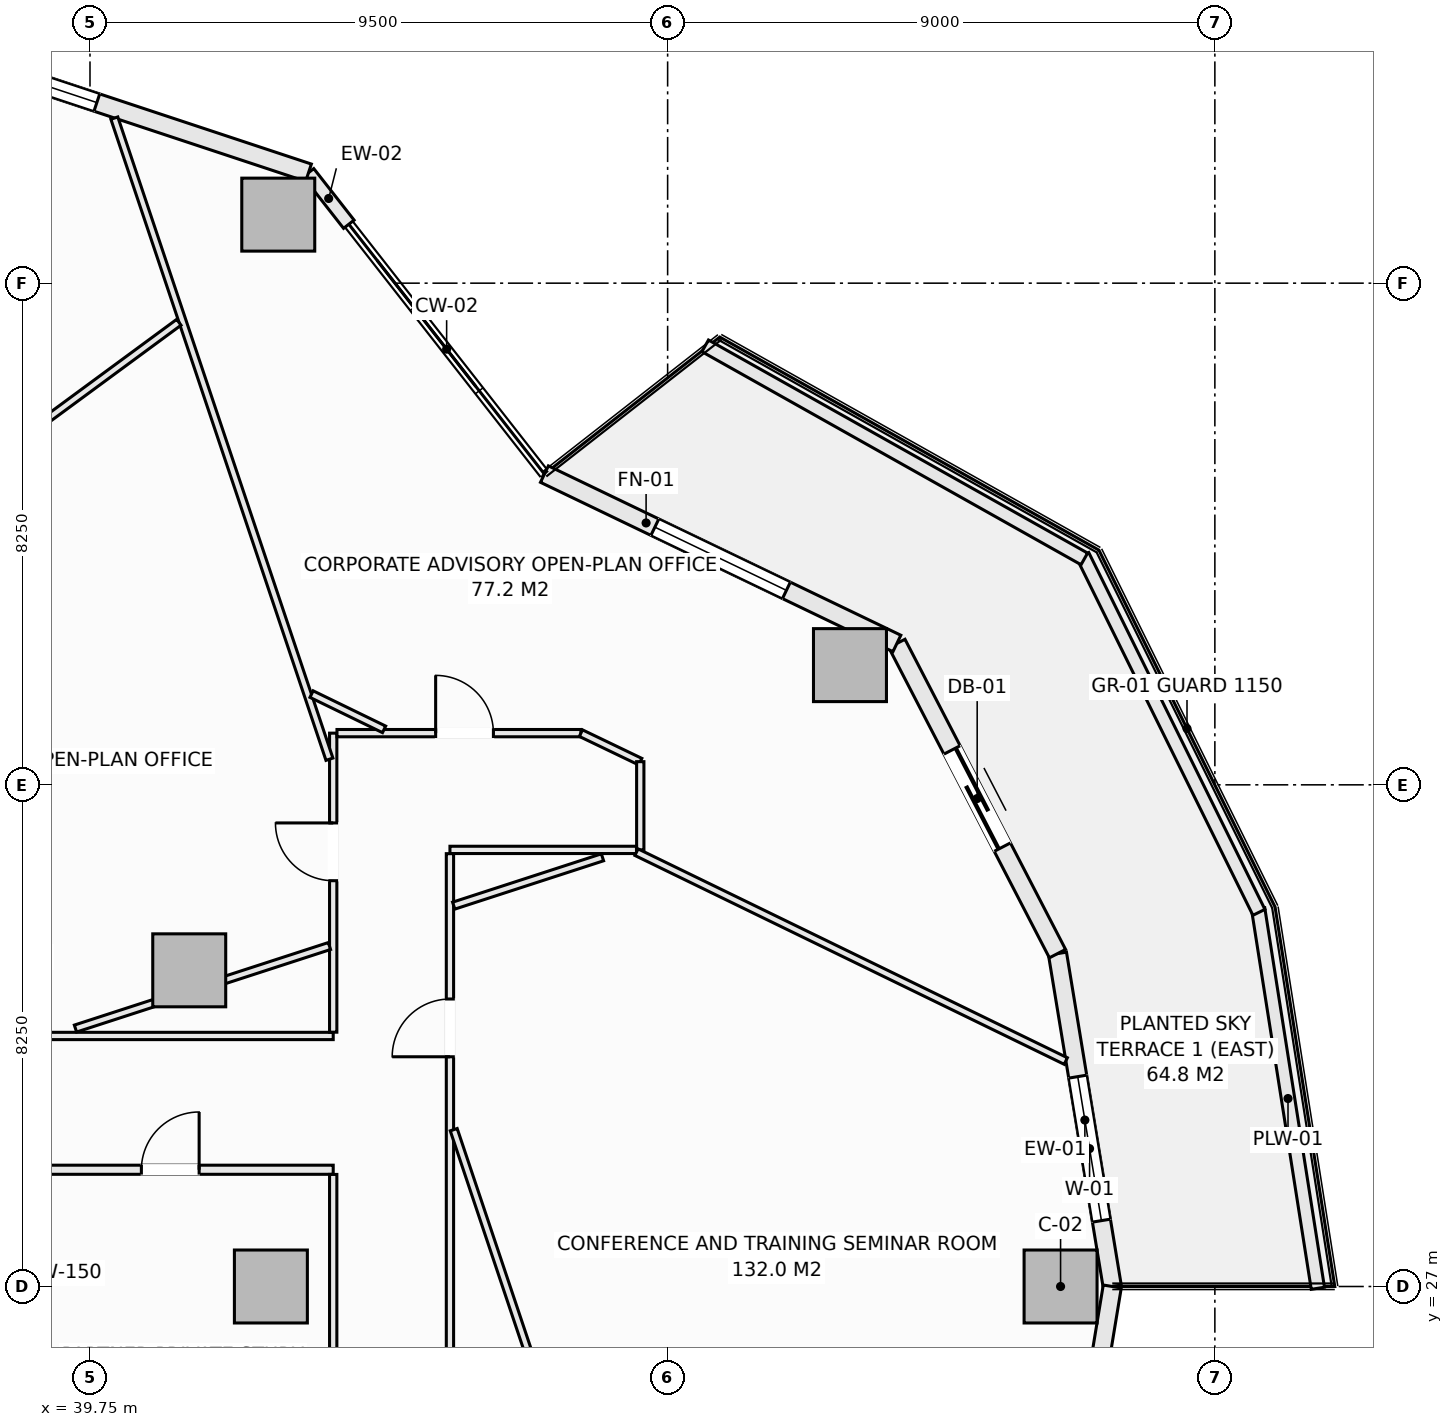
"""IFC4 building model, lengths in metres.
Left out: names, types, materials, properties, quantities, classifications, styles, units other than length and angle.
Written with IfcOpenShell. Run it as: python <this file> out.ifc"""

import sys

from ifc_helpers import new_model, si_unit, direction, frame, frame_2d, origin, origin_2d, place, context, subcontext, project, spatial, rectangle, extrude, element, fill, save


model = new_model("IFC4")
c1 = context("Model", 3, precision=1e-05, world=origin(), true_north=direction((0.0, 1.0)))
c2 = subcontext(c1, "Body", "Model", "MODEL_VIEW")
j1 = project(units=[si_unit("LENGTHUNIT", "METRE"), si_unit("PLANEANGLEUNIT", "RADIAN")], contexts=[c1])
p1 = place(None, origin())
s1 = spatial("IfcSite", under=j1, at=p1, CompositionType="ELEMENT")
p2 = place(p1, origin())
s2 = spatial("IfcBuilding", under=s1, at=p2, CompositionType="ELEMENT")
p3 = place(p2, frame((0.0, 0.0, 91.95)))
s3 = spatial("IfcBuildingStorey", under=s2, at=p3, CompositionType="ELEMENT", Elevation=91.95)
for number, where, z_axis, x_axis in (
    (1, (55.712, 27.0, -0.28), (0.0, 0.0, 1.0), (1.0, 0.0, 0.0)),
    (2, (52.249, 37.219, -0.28), (0.0, 0.0, 1.0), (1.0, 0.0, 0.0)),
    (3, (42.846, 44.627, -0.28), (0.0, 0.0, 1.0), (1.0, 0.0, 0.0)),
    (4, (42.725, 27.0, -0.28), (0.0, 0.0, 1.0), (1.0, 0.0, 0.0)),
    (5, (41.382, 32.199, -0.28), (0.0, 0.0, 1.0), (1.0, 0.0, 0.0)),
):
    element("IfcColumn", number, at=place(p3, frame(where, z_axis=z_axis, x_axis=x_axis)), inside=s3, PredefinedType="COLUMN", context=c2, shape_type="SweptSolid", body=[
        extrude(rectangle(XDim=1.2, YDim=1.2, at=origin_2d()), origin(), (0.0, 0.0, 1.0), 3.81),
    ])
p4 = place(p3, frame((55.662, 32.474, 0.0), z_axis=(0.0, 0.0, 1.0), x_axis=(0.162386212206, -0.986727276447, 0.0)))
e6 = element("IfcWall", 6, at=p4, inside=s3, PredefinedType="SOLIDWALL", context=c2, shape_type="SweptSolid", body=[
    extrude(rectangle(XDim=5.548, YDim=0.3, at=frame_2d((2.774, 0.0))), origin(), (0.0, 0.0, 1.0), 3.053),
])
p5 = place(p4, frame((2.05, 0.0, 0.85)))
e7 = element("IfcOpeningElement", 7, at=p5, cuts=e6, PredefinedType="OPENING", context=c2, shape_type="SweptSolid", body=[
    extrude(rectangle(XDim=2.4, YDim=1.9, at=frame_2d((1.2, 0.95))), frame((0.0, 0.16, 0.0), z_axis=(0.0, -1.0, 0.0), x_axis=(1.0, 0.0, 0.0)), (0.0, 0.0, 1.0), 0.32),
])
p6 = place(p3, frame((53.021, 37.575, 0.0), z_axis=(0.0, 0.0, 1.0), x_axis=(0.459800981414, -0.888021991558, 0.0)))
e8 = element("IfcWall", 8, at=p6, inside=s3, PredefinedType="SOLIDWALL", context=c2, shape_type="SweptSolid", body=[
    extrude(rectangle(XDim=5.744, YDim=0.3, at=frame_2d((2.872, 0.0))), origin(), (0.0, 0.0, 1.0), 3.053),
])
p7 = place(p6, frame((1.972, 0.0, 0.0)))
e9 = element("IfcOpeningElement", 9, at=p7, cuts=e8, PredefinedType="OPENING", context=c2, shape_type="SweptSolid", body=[
    extrude(rectangle(XDim=1.8, YDim=2.25, at=frame_2d((0.9, 1.125))), frame((0.0, 0.16, 0.0), z_axis=(0.0, -1.0, 0.0), x_axis=(1.0, 0.0, 0.0)), (0.0, 0.0, 1.0), 0.32),
])
p8 = place(p3, frame((47.224, 40.36, 0.0), z_axis=(0.0, 0.0, 1.0), x_axis=(0.901354747727, -0.433081538224, 0.0)))
e10 = element("IfcWall", 10, at=p8, inside=s3, PredefinedType="SOLIDWALL", context=c2, shape_type="SweptSolid", body=[
    extrude(rectangle(XDim=6.431, YDim=0.3, at=frame_2d((3.215, 0.0))), origin(), (0.0, 0.0, 1.0), 3.053),
])
p9 = place(p8, frame((2.015, 0.0, 0.85)))
e11 = element("IfcOpeningElement", 11, at=p9, cuts=e10, PredefinedType="OPENING", context=c2, shape_type="SweptSolid", body=[
    extrude(rectangle(XDim=2.4, YDim=1.9, at=frame_2d((1.2, 0.95))), frame((0.0, 0.16, 0.0), z_axis=(0.0, -1.0, 0.0), x_axis=(1.0, 0.0, 0.0)), (0.0, 0.0, 1.0), 0.32),
])
p10 = place(p3, frame((43.344, 45.316, 0.0), z_axis=(0.0, 0.0, 1.0), x_axis=(0.616387780378, -0.787442762492, 0.0)))
e12 = element("IfcWall", 12, at=p10, inside=s3, PredefinedType="SOLIDWALL", context=c2, shape_type="SweptSolid", body=[
    extrude(rectangle(XDim=1.076, YDim=0.22, at=frame_2d((0.538, 0.0))), origin(), (0.0, 0.0, 1.0), 3.053),
])
p11 = place(p3, frame((36.968, 47.429, 0.0), z_axis=(0.0, 0.0, 1.0), x_axis=(0.949245153629, -0.314537181127, 0.0)))
e13 = element("IfcWall", 13, at=p11, inside=s3, PredefinedType="SOLIDWALL", context=c2, shape_type="SweptSolid", body=[
    extrude(rectangle(XDim=6.717, YDim=0.3, at=frame_2d((3.358, 0.0))), origin(), (0.0, 0.0, 1.0), 3.053),
])
p12 = place(p11, frame((0.65, 0.0, 0.85)))
e14 = element("IfcOpeningElement", 14, at=p12, cuts=e13, PredefinedType="OPENING", context=c2, shape_type="SweptSolid", body=[
    extrude(rectangle(XDim=2.4, YDim=1.9, at=frame_2d((1.2, 0.95))), frame((0.0, 0.16, 0.0), z_axis=(0.0, -1.0, 0.0), x_axis=(1.0, 0.0, 0.0)), (0.0, 0.0, 1.0), 0.32),
])
p13 = place(p3, frame((55.662, 21.526, 0.0), z_axis=(0.0, 0.0, 1.0), x_axis=(0.162386212206, 0.986727276447, 0.0)))
e15 = element("IfcWall", 15, at=p13, inside=s3, PredefinedType="SOLIDWALL", context=c2, shape_type="SweptSolid", body=[
    extrude(rectangle(XDim=5.548, YDim=0.3, at=frame_2d((2.774, 0.0))), origin(), (0.0, 0.0, 1.0), 3.053),
])
p14 = place(p13, frame((1.574, 0.0, 0.85)))
e16 = element("IfcOpeningElement", 16, at=p14, cuts=e15, PredefinedType="OPENING", context=c2, shape_type="SweptSolid", body=[
    extrude(rectangle(XDim=2.4, YDim=1.9, at=frame_2d((1.2, 0.95))), frame((0.0, 0.16, 0.0), z_axis=(0.0, -1.0, 0.0), x_axis=(1.0, 0.0, 0.0)), (0.0, 0.0, 1.0), 0.32),
])
p15 = place(p3, frame((58.962, 33.212, 0.0), z_axis=(0.0, 0.0, 1.0), x_axis=(0.15545655238, -0.987842730561, 0.0)))
e17 = element("IfcWall", 17, at=p15, inside=s3, PredefinedType="PARAPET", context=c2, shape_type="SweptSolid", body=[
    extrude(rectangle(XDim=6.318, YDim=0.22, at=frame_2d((3.159, 0.0))), origin(), (0.0, 0.0, 1.0), 0.52),
])
p16 = place(p3, frame((56.077, 39.021, 0.0), z_axis=(0.0, 0.0, 1.0), x_axis=(0.442686636348, -0.89667638644, 0.0)))
e18 = element("IfcWall", 18, at=p16, inside=s3, PredefinedType="PARAPET", context=c2, shape_type="SweptSolid", body=[
    extrude(rectangle(XDim=6.545, YDim=0.22, at=frame_2d((3.272, 0.0))), origin(), (0.0, 0.0, 1.0), 0.52),
])
p17 = place(p3, frame((49.868, 42.469, 0.0), z_axis=(0.0, 0.0, 1.0), x_axis=(0.871775109335, -0.489906275468, 0.0)))
e19 = element("IfcWall", 19, at=p17, inside=s3, PredefinedType="PARAPET", context=c2, shape_type="SweptSolid", body=[
    extrude(rectangle(XDim=7.152, YDim=0.22, at=frame_2d((3.576, 0.0))), origin(), (0.0, 0.0, 1.0), 0.52),
])
p18 = place(p3, frame((30.077, 28.92, 0.0), z_axis=(0.0, 0.0, 1.0), x_axis=(1.0, 0.0, 0.0)))
e20 = element("IfcWall", 20, at=p18, inside=s3, PredefinedType="PARTITIONING", context=c2, shape_type="SweptSolid", body=[
    extrude(rectangle(XDim=13.673, YDim=0.15, at=frame_2d((6.836, 0.0))), origin(), (0.0, 0.0, 1.0), 3.53),
])
p19 = place(p18, frame((1.342, 0.0, 0.0)))
e21 = element("IfcOpeningElement", 21, at=p19, cuts=e20, PredefinedType="OPENING", context=c2, shape_type="SweptSolid", body=[
    extrude(rectangle(XDim=0.95, YDim=2.1, at=frame_2d((0.475, 1.05))), frame((0.0, 0.085, 0.0), z_axis=(0.0, -1.0, 0.0), x_axis=(1.0, 0.0, 0.0)), (0.0, 0.0, 1.0), 0.17),
])
p20 = place(p18, frame((5.498, 0.0, 0.0)))
e22 = element("IfcOpeningElement", 22, at=p20, cuts=e20, PredefinedType="OPENING", context=c2, shape_type="SweptSolid", body=[
    extrude(rectangle(XDim=0.95, YDim=2.1, at=frame_2d((0.475, 1.05))), frame((0.0, 0.085, 0.0), z_axis=(0.0, -1.0, 0.0), x_axis=(1.0, 0.0, 0.0)), (0.0, 0.0, 1.0), 0.17),
])
p21 = place(p18, frame((10.518, 0.0, 0.0)))
e23 = element("IfcOpeningElement", 23, at=p21, cuts=e20, PredefinedType="OPENING", context=c2, shape_type="SweptSolid", body=[
    extrude(rectangle(XDim=0.95, YDim=2.1, at=frame_2d((0.475, 1.05))), frame((0.0, 0.085, 0.0), z_axis=(0.0, -1.0, 0.0), x_axis=(1.0, 0.0, 0.0)), (0.0, 0.0, 1.0), 0.17),
])
p22 = place(p3, frame((39.02, 31.12, 0.0), z_axis=(0.0, 0.0, 1.0), x_axis=(1.0, 0.0, 0.0)))
e24 = element("IfcWall", 24, at=p22, inside=s3, PredefinedType="PARTITIONING", context=c2, shape_type="SweptSolid", body=[
    extrude(rectangle(XDim=4.73, YDim=0.12, at=frame_2d((2.365, 0.0))), origin(), (0.0, 0.0, 1.0), 3.53),
])
p23 = place(p3, frame((43.75, 25.197, 0.0), z_axis=(0.0, 0.0, 1.0), x_axis=(0.0, 1.0, 0.0)))
e25 = element("IfcWall", 25, at=p23, inside=s3, PredefinedType="PARTITIONING", context=c2, shape_type="SweptSolid", body=[
    extrude(rectangle(XDim=3.646, YDim=0.12, at=frame_2d((1.823, 0.0))), origin(), (0.0, 0.0, 1.0), 3.53),
])
p24 = place(p3, frame((43.75, 31.182, 0.0), z_axis=(0.0, 0.0, 1.0), x_axis=(0.0, 1.0, 0.0)))
e26 = element("IfcWall", 26, at=p24, inside=s3, PredefinedType="PARTITIONING", context=c2, shape_type="SweptSolid", body=[
    extrude(rectangle(XDim=4.918, YDim=0.12, at=frame_2d((2.459, 0.0))), origin(), (0.0, 0.0, 1.0), 3.53),
])
p25 = place(p24, frame((2.491, 0.0, 0.0)))
e27 = element("IfcOpeningElement", 27, at=p25, cuts=e26, PredefinedType="OPENING", context=c2, shape_type="SweptSolid", body=[
    extrude(rectangle(XDim=0.95, YDim=2.1, at=frame_2d((0.475, 1.05))), frame((0.0, 0.07, 0.0), z_axis=(0.0, -1.0, 0.0), x_axis=(1.0, 0.0, 0.0)), (0.0, 0.0, 1.0), 0.14),
])
p26 = place(p3, frame((43.812, 36.1, 0.0), z_axis=(0.0, 0.0, 1.0), x_axis=(1.0, 0.0, 0.0)))
e28 = element("IfcWall", 28, at=p26, inside=s3, PredefinedType="PARTITIONING", context=c2, shape_type="SweptSolid", body=[
    extrude(rectangle(XDim=4.012, YDim=0.12, at=frame_2d((2.006, 0.0))), origin(), (0.0, 0.0, 1.0), 3.53),
])
p27 = place(p26, frame((1.623, 0.0, 0.0)))
e29 = element("IfcOpeningElement", 29, at=p27, cuts=e28, PredefinedType="OPENING", context=c2, shape_type="SweptSolid", body=[
    extrude(rectangle(XDim=0.95, YDim=2.1, at=frame_2d((0.475, 1.05))), frame((0.0, 0.07, 0.0), z_axis=(0.0, -1.0, 0.0), x_axis=(1.0, 0.0, 0.0)), (0.0, 0.0, 1.0), 0.14),
])
p28 = place(p3, frame((47.824, 36.1, 0.0), z_axis=(0.0, 0.0, 1.0), x_axis=(0.901350599951, -0.433090170712, 0.0)))
e30 = element("IfcWall", 30, at=p28, inside=s3, PredefinedType="PARTITIONING", context=c2, shape_type="SweptSolid", body=[
    extrude(rectangle(XDim=1.083, YDim=0.12, at=frame_2d((0.542, 0.0))), origin(), (0.0, 0.0, 1.0), 3.53),
])
p29 = place(p3, frame((48.8, 34.18, 0.0), z_axis=(0.0, 0.0, 1.0), x_axis=(0.0, 1.0, 0.0)))
e31 = element("IfcWall", 31, at=p29, inside=s3, PredefinedType="PARTITIONING", context=c2, shape_type="SweptSolid", body=[
    extrude(rectangle(XDim=1.451, YDim=0.12, at=frame_2d((0.726, 0.0))), origin(), (0.0, 0.0, 1.0), 3.53),
])
p30 = place(p3, frame((45.67, 34.18, 0.0), z_axis=(0.0, 0.0, 1.0), x_axis=(1.0, 0.0, 0.0)))
e32 = element("IfcWall", 32, at=p30, inside=s3, PredefinedType="PARTITIONING", context=c2, shape_type="SweptSolid", body=[
    extrude(rectangle(XDim=3.068, YDim=0.12, at=frame_2d((1.534, 0.0))), origin(), (0.0, 0.0, 1.0), 3.165),
])
p31 = place(p3, frame((45.67, 19.32, 0.0), z_axis=(0.0, 0.0, 1.0), x_axis=(0.0, 1.0, 0.0)))
e33 = element("IfcWall", 33, at=p31, inside=s3, PredefinedType="PARTITIONING", context=c2, shape_type="SweptSolid", body=[
    extrude(rectangle(XDim=14.798, YDim=0.12, at=frame_2d((7.399, 0.0))), origin(), (0.0, 0.0, 1.0), 3.53),
])
p32 = place(p31, frame((11.458, 0.0, 0.0)))
e34 = element("IfcOpeningElement", 34, at=p32, cuts=e33, PredefinedType="OPENING", context=c2, shape_type="SweptSolid", body=[
    extrude(rectangle(XDim=0.95, YDim=2.1, at=frame_2d((0.475, 1.05))), frame((0.0, 0.07, 0.0), z_axis=(0.0, -1.0, 0.0), x_axis=(1.0, 0.0, 0.0)), (0.0, 0.0, 1.0), 0.14),
])
p33 = place(p3, frame((40.15, 46.215, 0.0), z_axis=(0.0, 0.0, 1.0), x_axis=(0.318097538603, -0.948057991863, 0.0)))
e35 = element("IfcWall", 35, at=p33, inside=s3, PredefinedType="PARTITIONING", context=c2, shape_type="SweptSolid", body=[
    extrude(rectangle(XDim=11.121, YDim=0.12, at=frame_2d((5.561, 0.0))), origin(), (0.0, 0.0, 1.0), 3.53),
])
p34 = place(p3, frame((45.732, 29.579, 0.0), z_axis=(0.0, 0.0, 1.0), x_axis=(0.318099793934, -0.948057235139, 0.0)))
e36 = element("IfcWall", 36, at=p34, inside=s3, PredefinedType="PARTITIONING", context=c2, shape_type="SweptSolid", body=[
    extrude(rectangle(XDim=10.756, YDim=0.12, at=frame_2d((5.378, 0.0))), origin(), (0.0, 0.0, 1.0), 3.53),
])
p35 = place(p3, frame((39.511, 31.242, 0.0), z_axis=(0.0, 0.0, 1.0), x_axis=(0.951052042302, 0.30903076357, 0.0)))
e37 = element("IfcWall", 37, at=p35, inside=s3, PredefinedType="PARTITIONING", context=c2, shape_type="SweptSolid", body=[
    extrude(rectangle(XDim=4.392, YDim=0.12, at=frame_2d((2.196, 0.0))), origin(), (0.0, 0.0, 1.0), 3.53),
])
p36 = place(p3, frame((45.732, 33.263, 0.0), z_axis=(0.0, 0.0, 1.0), x_axis=(0.951057081836, 0.309015253813, 0.0)))
e38 = element("IfcWall", 38, at=p36, inside=s3, PredefinedType="PARTITIONING", context=c2, shape_type="SweptSolid", body=[
    extrude(rectangle(XDim=2.573, YDim=0.12, at=frame_2d((1.286, 0.0))), origin(), (0.0, 0.0, 1.0), 3.53),
])
p37 = place(p3, frame((43.394, 36.742, 0.0), z_axis=(0.0, 0.0, 1.0), x_axis=(0.899305525601, -0.437320902339, 0.0)))
e39 = element("IfcWall", 39, at=p37, inside=s3, PredefinedType="PARTITIONING", context=c2, shape_type="SweptSolid", body=[
    extrude(rectangle(XDim=1.326, YDim=0.12, at=frame_2d((0.663, 0.0))), origin(), (0.0, 0.0, 1.0), 3.53),
])
p38 = place(p3, frame((48.738, 34.143, 0.0), z_axis=(0.0, 0.0, 1.0), x_axis=(0.899231452107, -0.437473194083, 0.0)))
e40 = element("IfcWall", 40, at=p38, inside=s3, PredefinedType="PARTITIONING", context=c2, shape_type="SweptSolid", body=[
    extrude(rectangle(XDim=7.852, YDim=0.12, at=frame_2d((3.926, 0.0))), origin(), (0.0, 0.0, 1.0), 3.53),
])
p39 = place(p3, frame((29.842, 34.495, 0.0), z_axis=(0.0, 0.0, 1.0), x_axis=(0.805582047077, 0.592484232219, 0.0)))
e41 = element("IfcWall", 41, at=p39, inside=s3, PredefinedType="PARTITIONING", context=c2, shape_type="SweptSolid", body=[
    extrude(rectangle(XDim=14.114, YDim=0.12, at=frame_2d((7.057, 0.0))), origin(), (0.0, 0.0, 1.0), 2.894),
])
p40 = place(p5, origin())
e42 = element("IfcWindow", 42, at=p40, inside=s3, PartitioningType="SINGLE_PANEL", PredefinedType="WINDOW", context=c2, shape_type="SweptSolid", body=[
    extrude(rectangle(XDim=2.4, YDim=1.9, at=frame_2d((1.2, 0.95))), frame((0.0, 0.03, 0.0), z_axis=(0.0, -1.0, 0.0), x_axis=(1.0, 0.0, 0.0)), (0.0, 0.0, 1.0), 0.06),
])
fill(e7, e42)
p41 = place(p7, origin())
e43 = element("IfcDoor", 43, at=p41, inside=s3, OperationType="SLIDING_TO_LEFT", PredefinedType="DOOR", context=c2, shape_type="SweptSolid", body=[
    extrude(rectangle(XDim=1.8, YDim=2.25, at=frame_2d((0.9, 1.125))), frame((0.0, 0.025, 0.0), z_axis=(0.0, -1.0, 0.0), x_axis=(1.0, 0.0, 0.0)), (0.0, 0.0, 1.0), 0.05),
])
fill(e9, e43)
p42 = place(p9, origin())
e44 = element("IfcWindow", 44, at=p42, inside=s3, PartitioningType="SINGLE_PANEL", PredefinedType="WINDOW", context=c2, shape_type="SweptSolid", body=[
    extrude(rectangle(XDim=2.4, YDim=1.9, at=frame_2d((1.2, 0.95))), frame((0.0, 0.03, 0.0), z_axis=(0.0, -1.0, 0.0), x_axis=(1.0, 0.0, 0.0)), (0.0, 0.0, 1.0), 0.06),
])
fill(e11, e44)
p43 = place(p12, origin())
e45 = element("IfcWindow", 45, at=p43, inside=s3, PartitioningType="SINGLE_PANEL", PredefinedType="WINDOW", context=c2, shape_type="SweptSolid", body=[
    extrude(rectangle(XDim=2.4, YDim=1.9, at=frame_2d((1.2, 0.95))), frame((0.0, 0.03, 0.0), z_axis=(0.0, -1.0, 0.0), x_axis=(1.0, 0.0, 0.0)), (0.0, 0.0, 1.0), 0.06),
])
fill(e14, e45)
p44 = place(p32, origin())
e46 = element("IfcDoor", 46, at=p44, inside=s3, OperationType="SINGLE_SWING_LEFT", PredefinedType="DOOR", context=c2, shape_type="SweptSolid", body=[
    extrude(rectangle(XDim=0.95, YDim=2.1, at=frame_2d((0.475, 1.05))), frame((0.0, 0.025, 0.0), z_axis=(0.0, -1.0, 0.0), x_axis=(1.0, 0.0, 0.0)), (0.0, 0.0, 1.0), 0.05),
])
fill(e34, e46)
p45 = place(p21, origin())
e47 = element("IfcDoor", 47, at=p45, inside=s3, OperationType="SINGLE_SWING_RIGHT", PredefinedType="DOOR", context=c2, shape_type="SweptSolid", body=[
    extrude(rectangle(XDim=0.95, YDim=2.1, at=frame_2d((0.475, 1.05))), frame((0.0, 0.025, 0.0), z_axis=(0.0, -1.0, 0.0), x_axis=(1.0, 0.0, 0.0)), (0.0, 0.0, 1.0), 0.05),
])
fill(e23, e47)
p46 = place(p27, origin())
e48 = element("IfcDoor", 48, at=p46, inside=s3, OperationType="SINGLE_SWING_LEFT", PredefinedType="DOOR", context=c2, shape_type="SweptSolid", body=[
    extrude(rectangle(XDim=0.95, YDim=2.1, at=frame_2d((0.475, 1.05))), frame((0.0, 0.025, 0.0), z_axis=(0.0, -1.0, 0.0), x_axis=(1.0, 0.0, 0.0)), (0.0, 0.0, 1.0), 0.05),
])
fill(e29, e48)
p47 = place(p25, origin())
e49 = element("IfcDoor", 49, at=p47, inside=s3, OperationType="SINGLE_SWING_RIGHT", PredefinedType="DOOR", context=c2, shape_type="SweptSolid", body=[
    extrude(rectangle(XDim=0.95, YDim=2.1, at=frame_2d((0.475, 1.05))), frame((0.0, 0.025, 0.0), z_axis=(0.0, -1.0, 0.0), x_axis=(1.0, 0.0, 0.0)), (0.0, 0.0, 1.0), 0.05),
])
fill(e27, e49)
save(model, sys.argv[1])
